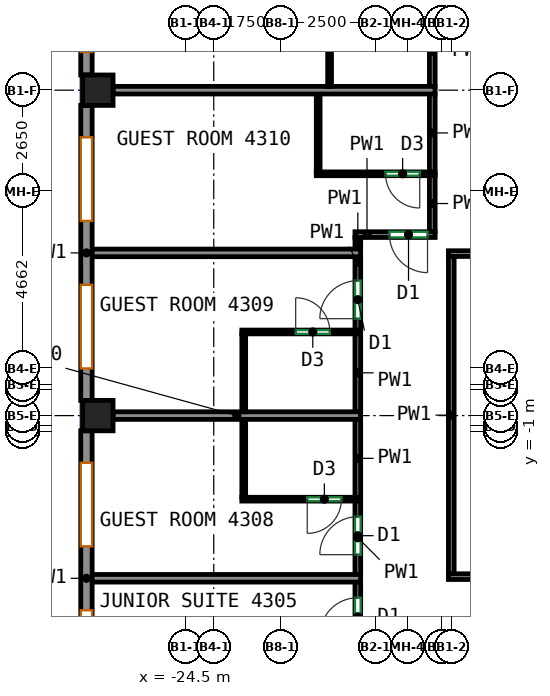
"""IFC4 building model, lengths in metres.
Left out: names, types, materials, properties, quantities, classifications, styles, units other than length and angle.
Written with IfcOpenShell. Run it as: python <this file> out.ifc"""

import sys

from ifc_helpers import new_model, si_unit, direction, frame, frame_2d, origin, origin_2d, place, context, subcontext, project, spatial, rectangle, extrude, source, transform, mapped, element, fill, save


model = new_model("IFC4")
c1 = context("Model", 3, precision=1e-05, world=origin(), true_north=direction((0.0, 1.0)))
c2 = subcontext(c1, "Body", "Model", "MODEL_VIEW")
j1 = project(units=[si_unit("LENGTHUNIT", "METRE"), si_unit("PLANEANGLEUNIT", "RADIAN")], contexts=[c1])
p1 = place(None, origin())
s1 = spatial("IfcSite", under=j1, at=p1, CompositionType="ELEMENT")
p2 = place(p1, origin())
s2 = spatial("IfcBuilding", under=s1, at=p2, CompositionType="ELEMENT")
p3 = place(p2, frame((0.0, 0.0, 182.1)))
s3 = spatial("IfcBuildingStorey", under=s2, at=p3, CompositionType="ELEMENT", Elevation=182.1)
m1 = source(origin(), c2, "Body", "SweptSolid", [
    extrude(rectangle(XDim=0.8, YDim=0.8, at=origin_2d()), origin(), (0.0, 0.0, 1.0), 3.12),
])
for number, where, z_axis, x_axis in (
    (1, (-26.8, -0.562, 0.0), (0.0, 0.0, 1.0), (1.0, 0.0, 0.0)),
    (2, (-26.8, 8.0, 0.0), (0.0, 0.0, 1.0), (1.0, 0.0, 0.0)),
):
    element("IfcColumn", number, at=place(p3, frame(where, z_axis=z_axis, x_axis=x_axis)), inside=s3, PredefinedType="COLUMN", context=c2, shape_type="MappedRepresentation", body=[
        mapped(m1, transform((0.0, 0.0, 0.0))),
    ])
m2 = source(origin(), c2, "Body", "SweptSolid", [
    extrude(rectangle(XDim=13.632, YDim=0.3, at=frame_2d((6.816, 0.0))), origin(), (0.0, 0.0, 1.0), 3.12),
])
p4 = place(p3, frame((-27.1, 22.032, 0.0), z_axis=(0.0, 0.0, 1.0), x_axis=(0.0, -1.0, 0.0)))
e3 = element("IfcWall", 3, at=p4, inside=s3, PredefinedType="SOLIDWALL", context=c2, shape_type="MappedRepresentation", body=[
    mapped(m2, transform((0.0, 0.0, 0.0))),
])
p5 = place(p4, frame((0.604, 0.0, 0.85)))
e4 = element("IfcOpeningElement", 4, at=p5, cuts=e3, PredefinedType="OPENING", context=c2, shape_type="SweptSolid", body=[
    extrude(rectangle(XDim=2.2, YDim=1.95, at=frame_2d((1.1, 0.975))), frame((0.0, 0.16, 0.0), z_axis=(0.0, -1.0, 0.0), x_axis=(1.0, 0.0, 0.0)), (0.0, 0.0, 1.0), 0.32),
])
p6 = place(p4, frame((4.012, 0.0, 0.85)))
e5 = element("IfcOpeningElement", 5, at=p6, cuts=e3, PredefinedType="OPENING", context=c2, shape_type="SweptSolid", body=[
    extrude(rectangle(XDim=2.2, YDim=1.95, at=frame_2d((1.1, 0.975))), frame((0.0, 0.16, 0.0), z_axis=(0.0, -1.0, 0.0), x_axis=(1.0, 0.0, 0.0)), (0.0, 0.0, 1.0), 0.32),
])
p7 = place(p4, frame((7.42, 0.0, 0.85)))
e6 = element("IfcOpeningElement", 6, at=p7, cuts=e3, PredefinedType="OPENING", context=c2, shape_type="SweptSolid", body=[
    extrude(rectangle(XDim=2.2, YDim=1.95, at=frame_2d((1.1, 0.975))), frame((0.0, 0.16, 0.0), z_axis=(0.0, -1.0, 0.0), x_axis=(1.0, 0.0, 0.0)), (0.0, 0.0, 1.0), 0.32),
])
p8 = place(p4, frame((10.828, 0.0, 0.85)))
e7 = element("IfcOpeningElement", 7, at=p8, cuts=e3, PredefinedType="OPENING", context=c2, shape_type="SweptSolid", body=[
    extrude(rectangle(XDim=2.2, YDim=1.95, at=frame_2d((1.1, 0.975))), frame((0.0, 0.16, 0.0), z_axis=(0.0, -1.0, 0.0), x_axis=(1.0, 0.0, 0.0)), (0.0, 0.0, 1.0), 0.32),
])
m3 = source(origin(), c2, "Body", "SweptSolid", [
    extrude(rectangle(XDim=7.763, YDim=0.3, at=frame_2d((3.881, 0.0))), origin(), (0.0, 0.0, 1.0), 3.12),
])
p9 = place(p3, frame((-27.1, 7.6, 0.0), z_axis=(0.0, 0.0, 1.0), x_axis=(0.0, -1.0, 0.0)))
e8 = element("IfcWall", 8, at=p9, inside=s3, PredefinedType="SOLIDWALL", context=c2, shape_type="MappedRepresentation", body=[
    mapped(m3, transform((0.0, 0.0, 0.0))),
])
p10 = place(p9, frame((0.841, 0.0, 0.85)))
e9 = element("IfcOpeningElement", 9, at=p10, cuts=e8, PredefinedType="OPENING", context=c2, shape_type="SweptSolid", body=[
    extrude(rectangle(XDim=2.2, YDim=1.95, at=frame_2d((1.1, 0.975))), frame((0.0, 0.16, 0.0), z_axis=(0.0, -1.0, 0.0), x_axis=(1.0, 0.0, 0.0)), (0.0, 0.0, 1.0), 0.32),
])
p11 = place(p9, frame((4.722, 0.0, 0.85)))
e10 = element("IfcOpeningElement", 10, at=p11, cuts=e8, PredefinedType="OPENING", context=c2, shape_type="SweptSolid", body=[
    extrude(rectangle(XDim=2.2, YDim=1.95, at=frame_2d((1.1, 0.975))), frame((0.0, 0.16, 0.0), z_axis=(0.0, -1.0, 0.0), x_axis=(1.0, 0.0, 0.0)), (0.0, 0.0, 1.0), 0.32),
])
p12 = place(p3, frame((-27.1, -0.962, 0.0), z_axis=(0.0, 0.0, 1.0), x_axis=(0.0, -1.0, 0.0)))
e11 = element("IfcWall", 11, at=p12, inside=s3, PredefinedType="SOLIDWALL", context=c2, shape_type="MappedRepresentation", body=[
    mapped(m3, transform((0.0, 0.0, 0.0))),
])
p13 = place(p12, frame((0.841, 0.0, 0.85)))
e12 = element("IfcOpeningElement", 12, at=p13, cuts=e11, PredefinedType="OPENING", context=c2, shape_type="SweptSolid", body=[
    extrude(rectangle(XDim=2.2, YDim=1.95, at=frame_2d((1.1, 0.975))), frame((0.0, 0.16, 0.0), z_axis=(0.0, -1.0, 0.0), x_axis=(1.0, 0.0, 0.0)), (0.0, 0.0, 1.0), 0.32),
])
p14 = place(p12, frame((4.722, 0.0, 0.85)))
e13 = element("IfcOpeningElement", 13, at=p14, cuts=e11, PredefinedType="OPENING", context=c2, shape_type="SweptSolid", body=[
    extrude(rectangle(XDim=2.2, YDim=1.95, at=frame_2d((1.1, 0.975))), frame((0.0, 0.16, 0.0), z_axis=(0.0, -1.0, 0.0), x_axis=(1.0, 0.0, 0.0)), (0.0, 0.0, 1.0), 0.32),
])
p15 = place(p3, frame((-19.959, -6.885, 0.0), z_axis=(0.0, 0.0, 1.0), x_axis=(0.0, 1.0, 0.0)))
e14 = element("IfcWall", 14, at=p15, inside=s3, PredefinedType="PARTITIONING", context=c2, shape_type="SweptSolid", body=[
    extrude(rectangle(XDim=1.952, YDim=0.15, at=frame_2d((0.976, 0.0))), origin(), (0.0, 0.0, 1.0), 3.12),
])
p16 = place(p15, frame((0.531, 0.0, 0.0)))
e15 = element("IfcOpeningElement", 15, at=p16, cuts=e14, PredefinedType="OPENING", context=c2, shape_type="SweptSolid", body=[
    extrude(rectangle(XDim=1.0, YDim=2.1, at=frame_2d((0.5, 1.05))), frame((0.0, 0.085, 0.0), z_axis=(0.0, -1.0, 0.0), x_axis=(1.0, 0.0, 0.0)), (0.0, 0.0, 1.0), 0.17),
])
p17 = place(p3, frame((-19.959, -4.753, 0.0), z_axis=(0.0, 0.0, 1.0), x_axis=(0.0, 1.0, 0.0)))
e16 = element("IfcWall", 16, at=p17, inside=s3, PredefinedType="PARTITIONING", context=c2, shape_type="SweptSolid", body=[
    extrude(rectangle(XDim=1.951, YDim=0.15, at=frame_2d((0.976, 0.0))), origin(), (0.0, 0.0, 1.0), 3.12),
])
p18 = place(p17, frame((0.531, 0.0, 0.0)))
e17 = element("IfcOpeningElement", 17, at=p18, cuts=e16, PredefinedType="OPENING", context=c2, shape_type="SweptSolid", body=[
    extrude(rectangle(XDim=1.0, YDim=2.1, at=frame_2d((0.5, 1.05))), frame((0.0, 0.085, 0.0), z_axis=(0.0, -1.0, 0.0), x_axis=(1.0, 0.0, 0.0)), (0.0, 0.0, 1.0), 0.17),
])
p19 = place(p3, frame((-19.959, -2.722, 0.0), z_axis=(0.0, 0.0, 1.0), x_axis=(0.0, 1.0, 0.0)))
e18 = element("IfcWall", 18, at=p19, inside=s3, PredefinedType="PARTITIONING", context=c2, shape_type="SweptSolid", body=[
    extrude(rectangle(XDim=2.07, YDim=0.15, at=frame_2d((1.035, 0.0))), origin(), (0.0, 0.0, 1.0), 3.12),
])
p20 = place(p3, frame((-19.959, 1.678, 0.0), z_axis=(0.0, 0.0, 1.0), x_axis=(0.0, 1.0, 0.0)))
e19 = element("IfcWall", 19, at=p20, inside=s3, PredefinedType="PARTITIONING", context=c2, shape_type="SweptSolid", body=[
    extrude(rectangle(XDim=1.951, YDim=0.15, at=frame_2d((0.976, 0.0))), origin(), (0.0, 0.0, 1.0), 3.12),
])
p21 = place(p20, frame((0.31, 0.0, 0.0)))
e20 = element("IfcOpeningElement", 20, at=p21, cuts=e19, PredefinedType="OPENING", context=c2, shape_type="SweptSolid", body=[
    extrude(rectangle(XDim=1.0, YDim=2.1, at=frame_2d((0.5, 1.05))), frame((0.0, 0.085, 0.0), z_axis=(0.0, -1.0, 0.0), x_axis=(1.0, 0.0, 0.0)), (0.0, 0.0, 1.0), 0.17),
])
p22 = place(p3, frame((-19.959, -0.472, 0.0), z_axis=(0.0, 0.0, 1.0), x_axis=(0.0, 1.0, 0.0)))
e21 = element("IfcWall", 21, at=p22, inside=s3, PredefinedType="PARTITIONING", context=c2, shape_type="SweptSolid", body=[
    extrude(rectangle(XDim=2.07, YDim=0.15, at=frame_2d((1.035, 0.0))), origin(), (0.0, 0.0, 1.0), 3.12),
])
p23 = place(p3, frame((-19.959, 3.809, 0.0), z_axis=(0.0, 0.0, 1.0), x_axis=(0.0, 1.0, 0.0)))
e22 = element("IfcWall", 22, at=p23, inside=s3, PredefinedType="PARTITIONING", context=c2, shape_type="SweptSolid", body=[
    extrude(rectangle(XDim=0.316, YDim=0.15, at=frame_2d((0.158, 0.0))), origin(), (0.0, 0.0, 1.0), 3.12),
])
p24 = place(p3, frame((-17.925, 4.2, 0.0), z_axis=(0.0, 0.0, 1.0), x_axis=(-1.0, 0.0, 0.0)))
e23 = element("IfcWall", 23, at=p24, inside=s3, PredefinedType="PARTITIONING", context=c2, shape_type="SweptSolid", body=[
    extrude(rectangle(XDim=2.109, YDim=0.15, at=frame_2d((1.054, 0.0))), origin(), (0.0, 0.0, 1.0), 3.12),
])
p25 = place(p24, frame((0.2, 0.0, 0.0)))
e24 = element("IfcOpeningElement", 24, at=p25, cuts=e23, PredefinedType="OPENING", context=c2, shape_type="SweptSolid", body=[
    extrude(rectangle(XDim=1.0, YDim=2.1, at=frame_2d((0.5, 1.05))), frame((0.0, 0.085, 0.0), z_axis=(0.0, -1.0, 0.0), x_axis=(1.0, 0.0, 0.0)), (0.0, 0.0, 1.0), 0.17),
])
p26 = place(p3, frame((-18.0, 4.275, 0.0), z_axis=(0.0, 0.0, 1.0), x_axis=(0.0, 1.0, 0.0)))
e25 = element("IfcWall", 25, at=p26, inside=s3, PredefinedType="PARTITIONING", context=c2, shape_type="SweptSolid", body=[
    extrude(rectangle(XDim=1.485, YDim=0.15, at=frame_2d((0.743, 0.0))), origin(), (0.0, 0.0, 1.0), 3.12),
])
p27 = place(p3, frame((-18.0, 5.84, 0.0), z_axis=(0.0, 0.0, 1.0), x_axis=(0.0, 1.0, 0.0)))
e26 = element("IfcWall", 26, at=p27, inside=s3, PredefinedType="PARTITIONING", context=c2, shape_type="SweptSolid", body=[
    extrude(rectangle(XDim=2.07, YDim=0.15, at=frame_2d((1.035, 0.0))), origin(), (0.0, 0.0, 1.0), 3.12),
])
p28 = place(p3, frame((-18.0, 8.09, 0.0), z_axis=(0.0, 0.0, 1.0), x_axis=(0.0, 1.0, 0.0)))
e27 = element("IfcWall", 27, at=p28, inside=s3, PredefinedType="PARTITIONING", context=c2, shape_type="SweptSolid", body=[
    extrude(rectangle(XDim=1.87, YDim=0.15, at=frame_2d((0.935, 0.0))), origin(), (0.0, 0.0, 1.0), 3.12),
])
p29 = place(p3, frame((-17.575, 3.7, 0.0), z_axis=(0.0, 0.0, 1.0), x_axis=(1.0, 0.0, 0.0)))
e28 = element("IfcWall", 28, at=p29, inside=s3, PredefinedType="PARTITIONING", context=c2, shape_type="SweptSolid", body=[
    extrude(rectangle(XDim=33.85, YDim=0.15, at=frame_2d((16.925, 0.0))), origin(), (0.0, 0.0, 1.0), 3.12),
])
p30 = place(p29, frame((4.201, 0.0, 0.0)))
e29 = element("IfcOpeningElement", 29, at=p30, cuts=e28, PredefinedType="OPENING", context=c2, shape_type="SweptSolid", body=[
    extrude(rectangle(XDim=0.9, YDim=2.1, at=frame_2d((0.45, 1.05))), frame((0.0, 0.085, 0.0), z_axis=(0.0, -1.0, 0.0), x_axis=(1.0, 0.0, 0.0)), (0.0, 0.0, 1.0), 0.17),
])
p31 = place(p29, frame((13.22, 0.0, 0.0)))
e30 = element("IfcOpeningElement", 30, at=p31, cuts=e28, PredefinedType="OPENING", context=c2, shape_type="SweptSolid", body=[
    extrude(rectangle(XDim=0.9, YDim=2.1, at=frame_2d((0.45, 1.05))), frame((0.0, 0.085, 0.0), z_axis=(0.0, -1.0, 0.0), x_axis=(1.0, 0.0, 0.0)), (0.0, 0.0, 1.0), 0.17),
])
p32 = place(p29, frame((23.959, 0.0, 0.0)))
e31 = element("IfcOpeningElement", 31, at=p32, cuts=e28, PredefinedType="OPENING", context=c2, shape_type="SweptSolid", body=[
    extrude(rectangle(XDim=0.9, YDim=2.1, at=frame_2d((0.45, 1.05))), frame((0.0, 0.085, 0.0), z_axis=(0.0, -1.0, 0.0), x_axis=(1.0, 0.0, 0.0)), (0.0, 0.0, 1.0), 0.17),
])
p33 = place(p3, frame((-17.5, -4.725, 0.0), z_axis=(0.0, 0.0, 1.0), x_axis=(0.0, 1.0, 0.0)))
e32 = element("IfcWall", 32, at=p33, inside=s3, PredefinedType="PARTITIONING", context=c2, shape_type="SweptSolid", body=[
    extrude(rectangle(XDim=8.35, YDim=0.15, at=frame_2d((4.175, 0.0))), origin(), (0.0, 0.0, 1.0), 3.12),
])
p34 = place(p3, frame((-17.575, -4.8, 0.0), z_axis=(0.0, 0.0, 1.0), x_axis=(1.0, 0.0, 0.0)))
e33 = element("IfcWall", 33, at=p34, inside=s3, PredefinedType="PARTITIONING", context=c2, shape_type="SweptSolid", body=[
    extrude(rectangle(XDim=3.702, YDim=0.15, at=frame_2d((1.851, 0.0))), origin(), (0.0, 0.0, 1.0), 3.12),
])
p35 = place(p3, frame((-27.0, -4.843, 0.0), z_axis=(0.0, 0.0, 1.0), x_axis=(1.0, 0.0, 0.0)))
e34 = element("IfcWall", 34, at=p35, inside=s3, PredefinedType="PARTITIONING", context=c2, shape_type="SweptSolid", body=[
    extrude(rectangle(XDim=7.114, YDim=0.2, at=frame_2d((3.557, 0.0))), origin(), (0.0, 0.0, 1.0), 3.12),
])
p36 = place(p3, frame((-19.886, -2.762, 0.0), z_axis=(0.0, 0.0, 1.0), x_axis=(-1.0, 0.0, 0.0)))
e35 = element("IfcWall", 35, at=p36, inside=s3, PredefinedType="PARTITIONING", context=c2, shape_type="SweptSolid", body=[
    extrude(rectangle(XDim=3.125, YDim=0.1, at=frame_2d((1.562, 0.0))), origin(), (0.0, 0.0, 1.0), 3.12),
])
p37 = place(p36, frame((0.504, 0.0, 0.0)))
e36 = element("IfcOpeningElement", 36, at=p37, cuts=e35, PredefinedType="OPENING", context=c2, shape_type="SweptSolid", body=[
    extrude(rectangle(XDim=0.9, YDim=2.1, at=frame_2d((0.45, 1.05))), frame((0.0, 0.06, 0.0), z_axis=(0.0, -1.0, 0.0), x_axis=(1.0, 0.0, 0.0)), (0.0, 0.0, 1.0), 0.12),
])
p38 = place(p3, frame((-22.961, -2.712, 0.0), z_axis=(0.0, 0.0, 1.0), x_axis=(0.0, 1.0, 0.0)))
e37 = element("IfcWall", 37, at=p38, inside=s3, PredefinedType="PARTITIONING", context=c2, shape_type="SweptSolid", body=[
    extrude(rectangle(XDim=2.05, YDim=0.1, at=frame_2d((1.025, 0.0))), origin(), (0.0, 0.0, 1.0), 3.12),
])
p39 = place(p3, frame((-26.4, -0.562, 0.0), z_axis=(0.0, 0.0, 1.0), x_axis=(1.0, 0.0, 0.0)))
e38 = element("IfcWall", 38, at=p39, inside=s3, PredefinedType="PARTITIONING", context=c2, shape_type="SweptSolid", body=[
    extrude(rectangle(XDim=6.514, YDim=0.2, at=frame_2d((3.257, 0.0))), origin(), (0.0, 0.0, 1.0), 2.52),
])
p40 = place(p3, frame((-23.011, 1.638, 0.0), z_axis=(0.0, 0.0, 1.0), x_axis=(1.0, 0.0, 0.0)))
e39 = element("IfcWall", 39, at=p40, inside=s3, PredefinedType="PARTITIONING", context=c2, shape_type="SweptSolid", body=[
    extrude(rectangle(XDim=3.125, YDim=0.1, at=frame_2d((1.562, 0.0))), origin(), (0.0, 0.0, 1.0), 3.12),
])
p41 = place(p40, frame((1.417, 0.0, 0.0)))
e40 = element("IfcOpeningElement", 40, at=p41, cuts=e39, PredefinedType="OPENING", context=c2, shape_type="SweptSolid", body=[
    extrude(rectangle(XDim=0.9, YDim=2.1, at=frame_2d((0.45, 1.05))), frame((0.0, 0.06, 0.0), z_axis=(0.0, -1.0, 0.0), x_axis=(1.0, 0.0, 0.0)), (0.0, 0.0, 1.0), 0.12),
])
p42 = place(p3, frame((-22.961, -0.462, 0.0), z_axis=(0.0, 0.0, 1.0), x_axis=(0.0, 1.0, 0.0)))
e41 = element("IfcWall", 41, at=p42, inside=s3, PredefinedType="PARTITIONING", context=c2, shape_type="SweptSolid", body=[
    extrude(rectangle(XDim=2.05, YDim=0.1, at=frame_2d((1.025, 0.0))), origin(), (0.0, 0.0, 1.0), 3.12),
])
p43 = place(p3, frame((-27.0, 3.719, 0.0), z_axis=(0.0, 0.0, 1.0), x_axis=(1.0, 0.0, 0.0)))
e42 = element("IfcWall", 42, at=p43, inside=s3, PredefinedType="PARTITIONING", context=c2, shape_type="SweptSolid", body=[
    extrude(rectangle(XDim=7.114, YDim=0.2, at=frame_2d((3.557, 0.0))), origin(), (0.0, 0.0, 1.0), 3.12),
])
p44 = place(p3, frame((-17.927, 5.8, 0.0), z_axis=(0.0, 0.0, 1.0), x_axis=(-1.0, 0.0, 0.0)))
e43 = element("IfcWall", 43, at=p44, inside=s3, PredefinedType="PARTITIONING", context=c2, shape_type="SweptSolid", body=[
    extrude(rectangle(XDim=3.125, YDim=0.1, at=frame_2d((1.562, 0.0))), origin(), (0.0, 0.0, 1.0), 3.12),
])
p45 = place(p44, frame((0.403, 0.0, 0.0)))
e44 = element("IfcOpeningElement", 44, at=p45, cuts=e43, PredefinedType="OPENING", context=c2, shape_type="SweptSolid", body=[
    extrude(rectangle(XDim=0.9, YDim=2.1, at=frame_2d((0.45, 1.05))), frame((0.0, 0.06, 0.0), z_axis=(0.0, -1.0, 0.0), x_axis=(1.0, 0.0, 0.0)), (0.0, 0.0, 1.0), 0.12),
])
p46 = place(p3, frame((-21.002, 5.85, 0.0), z_axis=(0.0, 0.0, 1.0), x_axis=(0.0, 1.0, 0.0)))
e45 = element("IfcWall", 45, at=p46, inside=s3, PredefinedType="PARTITIONING", context=c2, shape_type="SweptSolid", body=[
    extrude(rectangle(XDim=2.05, YDim=0.1, at=frame_2d((1.025, 0.0))), origin(), (0.0, 0.0, 1.0), 3.12),
])
p47 = place(p3, frame((-26.4, 8.0, 0.0), z_axis=(0.0, 0.0, 1.0), x_axis=(1.0, 0.0, 0.0)))
e46 = element("IfcWall", 46, at=p47, inside=s3, PredefinedType="PARTITIONING", context=c2, shape_type="SweptSolid", body=[
    extrude(rectangle(XDim=8.473, YDim=0.2, at=frame_2d((4.236, 0.0))), origin(), (0.0, 0.0, 1.0), 3.12),
])
p48 = place(p3, frame((-20.702, 8.1, 0.0), z_axis=(0.0, 0.0, 1.0), x_axis=(0.0, 1.0, 0.0)))
e47 = element("IfcWall", 47, at=p48, inside=s3, PredefinedType="PARTITIONING", context=c2, shape_type="SweptSolid", body=[
    extrude(rectangle(XDim=1.85, YDim=0.1, at=frame_2d((0.925, 0.0))), origin(), (0.0, 0.0, 1.0), 3.12),
])
p49 = place(p10, origin())
e48 = element("IfcWindow", 48, at=p49, inside=s3, PartitioningType="SINGLE_PANEL", PredefinedType="WINDOW", context=c2, shape_type="SweptSolid", body=[
    extrude(rectangle(XDim=2.2, YDim=1.95, at=frame_2d((1.1, 0.975))), frame((0.0, 0.03, 0.0), z_axis=(0.0, -1.0, 0.0), x_axis=(1.0, 0.0, 0.0)), (0.0, 0.0, 1.0), 0.06),
])
fill(e9, e48)
p50 = place(p11, origin())
e49 = element("IfcWindow", 49, at=p50, inside=s3, PartitioningType="SINGLE_PANEL", PredefinedType="WINDOW", context=c2, shape_type="SweptSolid", body=[
    extrude(rectangle(XDim=2.2, YDim=1.95, at=frame_2d((1.1, 0.975))), frame((0.0, 0.03, 0.0), z_axis=(0.0, -1.0, 0.0), x_axis=(1.0, 0.0, 0.0)), (0.0, 0.0, 1.0), 0.06),
])
fill(e10, e49)
p51 = place(p13, origin())
e50 = element("IfcWindow", 50, at=p51, inside=s3, PartitioningType="SINGLE_PANEL", PredefinedType="WINDOW", context=c2, shape_type="SweptSolid", body=[
    extrude(rectangle(XDim=2.2, YDim=1.95, at=frame_2d((1.1, 0.975))), frame((0.0, 0.03, 0.0), z_axis=(0.0, -1.0, 0.0), x_axis=(1.0, 0.0, 0.0)), (0.0, 0.0, 1.0), 0.06),
])
fill(e12, e50)
p52 = place(p14, origin())
e51 = element("IfcWindow", 51, at=p52, inside=s3, PartitioningType="SINGLE_PANEL", PredefinedType="WINDOW", context=c2, shape_type="SweptSolid", body=[
    extrude(rectangle(XDim=2.2, YDim=1.95, at=frame_2d((1.1, 0.975))), frame((0.0, 0.03, 0.0), z_axis=(0.0, -1.0, 0.0), x_axis=(1.0, 0.0, 0.0)), (0.0, 0.0, 1.0), 0.06),
])
fill(e13, e51)
p53 = place(p16, origin())
e52 = element("IfcDoor", 52, at=p53, inside=s3, OperationType="SINGLE_SWING_LEFT", PredefinedType="DOOR", context=c2, shape_type="SweptSolid", body=[
    extrude(rectangle(XDim=1.0, YDim=2.1, at=frame_2d((0.5, 1.05))), frame((0.0, 0.025, 0.0), z_axis=(0.0, -1.0, 0.0), x_axis=(1.0, 0.0, 0.0)), (0.0, 0.0, 1.0), 0.05),
])
fill(e15, e52)
p54 = place(p18, origin())
e53 = element("IfcDoor", 53, at=p54, inside=s3, OperationType="SINGLE_SWING_LEFT", PredefinedType="DOOR", context=c2, shape_type="SweptSolid", body=[
    extrude(rectangle(XDim=1.0, YDim=2.1, at=frame_2d((0.5, 1.05))), frame((0.0, 0.025, 0.0), z_axis=(0.0, -1.0, 0.0), x_axis=(1.0, 0.0, 0.0)), (0.0, 0.0, 1.0), 0.05),
])
fill(e17, e53)
p55 = place(p37, origin())
e54 = element("IfcDoor", 54, at=p55, inside=s3, OperationType="SINGLE_SWING_RIGHT", PredefinedType="DOOR", context=c2, shape_type="SweptSolid", body=[
    extrude(rectangle(XDim=0.9, YDim=2.1, at=frame_2d((0.45, 1.05))), frame((0.0, 0.025, 0.0), z_axis=(0.0, -1.0, 0.0), x_axis=(1.0, 0.0, 0.0)), (0.0, 0.0, 1.0), 0.05),
])
fill(e36, e54)
p56 = place(p41, origin())
e55 = element("IfcDoor", 55, at=p56, inside=s3, OperationType="SINGLE_SWING_LEFT", PredefinedType="DOOR", context=c2, shape_type="SweptSolid", body=[
    extrude(rectangle(XDim=0.9, YDim=2.1, at=frame_2d((0.45, 1.05))), frame((0.0, 0.025, 0.0), z_axis=(0.0, -1.0, 0.0), x_axis=(1.0, 0.0, 0.0)), (0.0, 0.0, 1.0), 0.05),
])
fill(e40, e55)
p57 = place(p21, origin())
e56 = element("IfcDoor", 56, at=p57, inside=s3, OperationType="SINGLE_SWING_LEFT", PredefinedType="DOOR", context=c2, shape_type="SweptSolid", body=[
    extrude(rectangle(XDim=1.0, YDim=2.1, at=frame_2d((0.5, 1.05))), frame((0.0, 0.025, 0.0), z_axis=(0.0, -1.0, 0.0), x_axis=(1.0, 0.0, 0.0)), (0.0, 0.0, 1.0), 0.05),
])
fill(e20, e56)
p58 = place(p25, origin())
e57 = element("IfcDoor", 57, at=p58, inside=s3, OperationType="SINGLE_SWING_LEFT", PredefinedType="DOOR", context=c2, shape_type="SweptSolid", body=[
    extrude(rectangle(XDim=1.0, YDim=2.1, at=frame_2d((0.5, 1.05))), frame((0.0, 0.025, 0.0), z_axis=(0.0, -1.0, 0.0), x_axis=(1.0, 0.0, 0.0)), (0.0, 0.0, 1.0), 0.05),
])
fill(e24, e57)
p59 = place(p45, origin())
e58 = element("IfcDoor", 58, at=p59, inside=s3, OperationType="SINGLE_SWING_LEFT", PredefinedType="DOOR", context=c2, shape_type="SweptSolid", body=[
    extrude(rectangle(XDim=0.9, YDim=2.1, at=frame_2d((0.45, 1.05))), frame((0.0, 0.025, 0.0), z_axis=(0.0, -1.0, 0.0), x_axis=(1.0, 0.0, 0.0)), (0.0, 0.0, 1.0), 0.05),
])
fill(e44, e58)
save(model, sys.argv[1])
